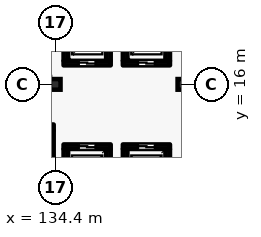
"""IFC4 building model, lengths in metres.
Left out: names, types, materials, properties, quantities, classifications, styles, units other than length and angle.
Written with IfcOpenShell. Run it as: python <this file> out.ifc"""

import sys

from ifc_helpers import new_model, si_unit, direction, frame, frame_2d, origin, origin_2d, place, context, subcontext, project, spatial, rectangle, extrude, element, fill, save


model = new_model("IFC4")
c1 = context("Model", 3, precision=1e-05, world=origin(), true_north=direction((0.0, 1.0)))
c2 = subcontext(c1, "Body", "Model", "MODEL_VIEW")
j1 = project(units=[si_unit("LENGTHUNIT", "METRE"), si_unit("PLANEANGLEUNIT", "RADIAN")], contexts=[c1])
p1 = place(None, origin())
s1 = spatial("IfcSite", under=j1, at=p1, CompositionType="ELEMENT")
p2 = place(p1, origin())
s2 = spatial("IfcBuilding", under=s1, at=p2, CompositionType="ELEMENT")
p3 = place(p2, frame((0.0, 0.0, 28.8)))
s3 = spatial("IfcBuildingStorey", under=s2, at=p3, CompositionType="ELEMENT", Elevation=28.8)
for number, where, z_axis, x_axis in (
    (1, (134.4, 16.0, 0.0), (0.0, 0.0, 1.0), (1.0, 0.0, 0.0)),
    (2, (142.8, 16.0, 0.0), (0.0, 0.0, 1.0), (1.0, 0.0, 0.0)),
):
    element("IfcColumn", number, at=place(p3, frame(where, z_axis=z_axis, x_axis=x_axis)), inside=s3, PredefinedType="COLUMN", context=c2, shape_type="SweptSolid", body=[
        extrude(rectangle(XDim=0.7, YDim=0.7, at=origin_2d()), origin(), (0.0, 0.0, 1.0), 3.6),
    ])
p4 = place(p3, frame((134.95, 17.4, 0.0), z_axis=(0.0, 0.0, 1.0), x_axis=(1.0, 0.0, 0.0)))
e3 = element("IfcWall", 3, at=p4, inside=s3, PredefinedType="SHEAR", context=c2, shape_type="SweptSolid", body=[
    extrude(rectangle(XDim=3.1, YDim=0.3, at=frame_2d((1.55, 0.0))), origin(), (0.0, 0.0, 1.0), 3.365),
])
p5 = place(p4, frame((1.0, 0.0, 0.0)))
e4 = element("IfcOpeningElement", 4, at=p5, cuts=e3, PredefinedType="OPENING", context=c2, shape_type="SweptSolid", body=[
    extrude(rectangle(XDim=1.1, YDim=2.2, at=frame_2d((0.55, 1.1))), frame((0.0, 0.16, 0.0), z_axis=(0.0, -1.0, 0.0), x_axis=(1.0, 0.0, 0.0)), (0.0, 0.0, 1.0), 0.32),
])
for number, where, z_axis, x_axis in (
    (5, (137.9, 17.555, 0.0), (0.0, 0.0, 1.0), (0.0, 1.0, 0.0)),
    (6, (135.1, 20.145, 0.0), (0.0, 0.0, 1.0), (0.0, -1.0, 0.0)),
):
    element("IfcWall", number, at=place(p3, frame(where, z_axis=z_axis, x_axis=x_axis)), inside=s3, PredefinedType="SHEAR", context=c2, shape_type="SweptSolid", body=[
        extrude(rectangle(XDim=2.59, YDim=0.3, at=frame_2d((1.295, 0.0))), origin(), (0.0, 0.0, 1.0), 3.365),
    ])
p6 = place(p3, frame((138.85, 17.4, 0.0), z_axis=(0.0, 0.0, 1.0), x_axis=(1.0, 0.0, 0.0)))
e7 = element("IfcWall", 7, at=p6, inside=s3, PredefinedType="SHEAR", context=c2, shape_type="SweptSolid", body=[
    extrude(rectangle(XDim=3.1, YDim=0.3, at=frame_2d((1.55, 0.0))), origin(), (0.0, 0.0, 1.0), 3.365),
])
p7 = place(p6, frame((1.0, 0.0, 0.0)))
e8 = element("IfcOpeningElement", 8, at=p7, cuts=e7, PredefinedType="OPENING", context=c2, shape_type="SweptSolid", body=[
    extrude(rectangle(XDim=1.1, YDim=2.2, at=frame_2d((0.55, 1.1))), frame((0.0, 0.16, 0.0), z_axis=(0.0, -1.0, 0.0), x_axis=(1.0, 0.0, 0.0)), (0.0, 0.0, 1.0), 0.32),
])
for number, where, z_axis, x_axis in (
    (9, (141.8, 17.555, 0.0), (0.0, 0.0, 1.0), (0.0, 1.0, 0.0)),
    (10, (139.0, 20.145, 0.0), (0.0, 0.0, 1.0), (0.0, -1.0, 0.0)),
    (11, (137.9, 9.155, 0.0), (0.0, 0.0, 1.0), (0.0, 1.0, 0.0)),
):
    element("IfcWall", number, at=place(p3, frame(where, z_axis=z_axis, x_axis=x_axis)), inside=s3, PredefinedType="SHEAR", context=c2, shape_type="SweptSolid", body=[
        extrude(rectangle(XDim=2.59, YDim=0.3, at=frame_2d((1.295, 0.0))), origin(), (0.0, 0.0, 1.0), 3.365),
    ])
p8 = place(p3, frame((138.05, 11.9, 0.0), z_axis=(0.0, 0.0, 1.0), x_axis=(-1.0, 0.0, 0.0)))
e12 = element("IfcWall", 12, at=p8, inside=s3, PredefinedType="SHEAR", context=c2, shape_type="SweptSolid", body=[
    extrude(rectangle(XDim=3.1, YDim=0.3, at=frame_2d((1.55, 0.0))), origin(), (0.0, 0.0, 1.0), 3.365),
])
p9 = place(p8, frame((1.0, 0.0, 0.0)))
e13 = element("IfcOpeningElement", 13, at=p9, cuts=e12, PredefinedType="OPENING", context=c2, shape_type="SweptSolid", body=[
    extrude(rectangle(XDim=1.1, YDim=2.2, at=frame_2d((0.55, 1.1))), frame((0.0, 0.16, 0.0), z_axis=(0.0, -1.0, 0.0), x_axis=(1.0, 0.0, 0.0)), (0.0, 0.0, 1.0), 0.32),
])
for number, where, z_axis, x_axis in (
    (14, (135.1, 11.745, 0.0), (0.0, 0.0, 1.0), (0.0, -1.0, 0.0)),
    (15, (141.8, 9.155, 0.0), (0.0, 0.0, 1.0), (0.0, 1.0, 0.0)),
):
    element("IfcWall", number, at=place(p3, frame(where, z_axis=z_axis, x_axis=x_axis)), inside=s3, PredefinedType="SHEAR", context=c2, shape_type="SweptSolid", body=[
        extrude(rectangle(XDim=2.59, YDim=0.3, at=frame_2d((1.295, 0.0))), origin(), (0.0, 0.0, 1.0), 3.365),
    ])
p10 = place(p3, frame((141.95, 11.9, 0.0), z_axis=(0.0, 0.0, 1.0), x_axis=(-1.0, 0.0, 0.0)))
e16 = element("IfcWall", 16, at=p10, inside=s3, PredefinedType="SHEAR", context=c2, shape_type="SweptSolid", body=[
    extrude(rectangle(XDim=3.1, YDim=0.3, at=frame_2d((1.55, 0.0))), origin(), (0.0, 0.0, 1.0), 3.365),
])
p11 = place(p10, frame((1.0, 0.0, 0.0)))
e17 = element("IfcOpeningElement", 17, at=p11, cuts=e16, PredefinedType="OPENING", context=c2, shape_type="SweptSolid", body=[
    extrude(rectangle(XDim=1.1, YDim=2.2, at=frame_2d((0.55, 1.1))), frame((0.0, 0.16, 0.0), z_axis=(0.0, -1.0, 0.0), x_axis=(1.0, 0.0, 0.0)), (0.0, 0.0, 1.0), 0.32),
])
p12 = place(p3, frame((139.0, 11.745, 0.0), z_axis=(0.0, 0.0, 1.0), x_axis=(0.0, -1.0, 0.0)))
e18 = element("IfcWall", 18, at=p12, inside=s3, PredefinedType="SHEAR", context=c2, shape_type="SweptSolid", body=[
    extrude(rectangle(XDim=2.59, YDim=0.3, at=frame_2d((1.295, 0.0))), origin(), (0.0, 0.0, 1.0), 3.365),
])
p13 = place(p3, frame((134.1, 9.005, 0.0), z_axis=(0.0, 0.0, 1.0), x_axis=(0.0, 1.0, 0.0)))
e19 = element("IfcWall", 19, at=p13, inside=s3, PredefinedType="SHEAR", context=c2, shape_type="SweptSolid", body=[
    extrude(rectangle(XDim=3.95, YDim=0.4, at=frame_2d((1.975, 0.0))), origin(), (0.0, 0.0, 1.0), 3.365),
])
p14 = place(p3, frame((126.1, 13.16, 0.0), z_axis=(0.0, 0.0, 1.0), x_axis=(1.0, 0.0, 0.0)))
e20 = element("IfcWall", 20, at=p14, inside=s3, PredefinedType="SHEAR", context=c2, shape_type="SweptSolid", body=[
    extrude(rectangle(XDim=8.2, YDim=0.4, at=frame_2d((4.1, 0.0))), origin(), (0.0, 0.0, 1.0), 3.365),
])
p15 = place(p14, frame((0.43, 0.0, 0.0)))
e21 = element("IfcOpeningElement", 21, at=p15, cuts=e20, PredefinedType="OPENING", context=c2, shape_type="SweptSolid", body=[
    extrude(rectangle(XDim=1.16, YDim=2.2, at=frame_2d((0.58, 1.1))), frame((0.0, 0.21, 0.0), z_axis=(0.0, -1.0, 0.0), x_axis=(1.0, 0.0, 0.0)), (0.0, 0.0, 1.0), 0.42),
])
p16 = place(p5, origin())
e22 = element("IfcDoor", 22, at=p16, inside=s3, OperationType="DOUBLE_DOOR_SLIDING", PredefinedType="DOOR", context=c2, shape_type="SweptSolid", body=[
    extrude(rectangle(XDim=1.1, YDim=2.2, at=frame_2d((0.55, 1.1))), frame((0.0, 0.025, 0.0), z_axis=(0.0, -1.0, 0.0), x_axis=(1.0, 0.0, 0.0)), (0.0, 0.0, 1.0), 0.05),
])
fill(e4, e22)
p17 = place(p7, origin())
e23 = element("IfcDoor", 23, at=p17, inside=s3, OperationType="DOUBLE_DOOR_SLIDING", PredefinedType="DOOR", context=c2, shape_type="SweptSolid", body=[
    extrude(rectangle(XDim=1.1, YDim=2.2, at=frame_2d((0.55, 1.1))), frame((0.0, 0.025, 0.0), z_axis=(0.0, -1.0, 0.0), x_axis=(1.0, 0.0, 0.0)), (0.0, 0.0, 1.0), 0.05),
])
fill(e8, e23)
p18 = place(p9, origin())
e24 = element("IfcDoor", 24, at=p18, inside=s3, OperationType="DOUBLE_DOOR_SLIDING", PredefinedType="DOOR", context=c2, shape_type="SweptSolid", body=[
    extrude(rectangle(XDim=1.1, YDim=2.2, at=frame_2d((0.55, 1.1))), frame((0.0, 0.025, 0.0), z_axis=(0.0, -1.0, 0.0), x_axis=(1.0, 0.0, 0.0)), (0.0, 0.0, 1.0), 0.05),
])
fill(e13, e24)
p19 = place(p11, origin())
e25 = element("IfcDoor", 25, at=p19, inside=s3, OperationType="DOUBLE_DOOR_SLIDING", PredefinedType="DOOR", context=c2, shape_type="SweptSolid", body=[
    extrude(rectangle(XDim=1.1, YDim=2.2, at=frame_2d((0.55, 1.1))), frame((0.0, 0.025, 0.0), z_axis=(0.0, -1.0, 0.0), x_axis=(1.0, 0.0, 0.0)), (0.0, 0.0, 1.0), 0.05),
])
fill(e17, e25)
save(model, sys.argv[1])
